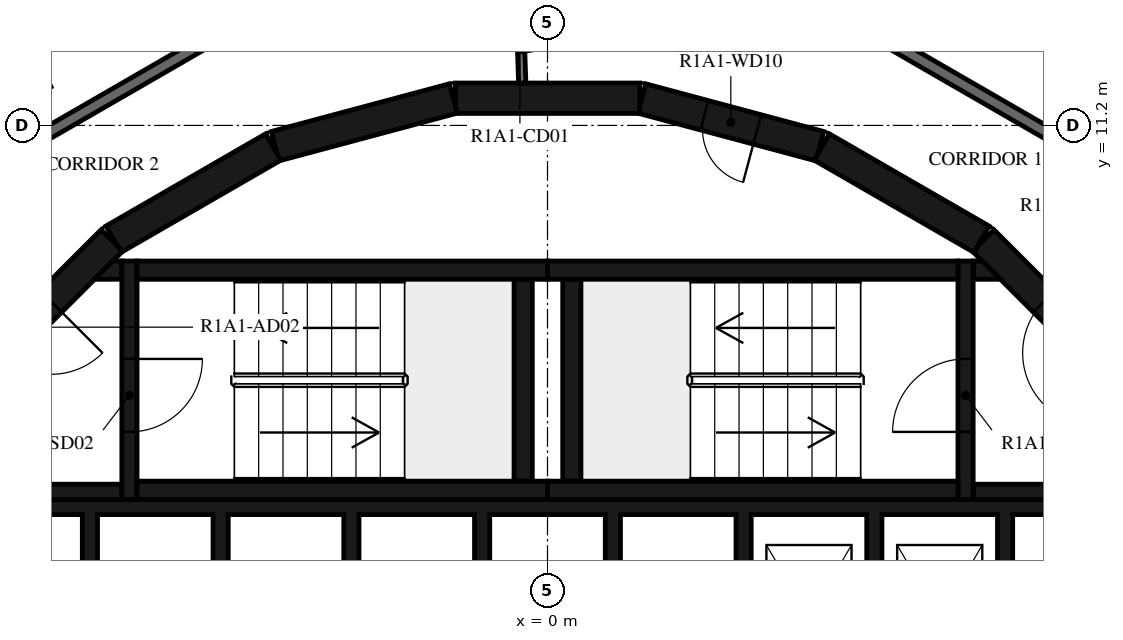
"""IFC4 building model, lengths in metres.
Left out: names, types, materials, properties, quantities, classifications, styles, units other than length and angle.
Written with IfcOpenShell. Run it as: python <this file> out.ifc"""

import sys

from ifc_helpers import new_model, si_unit, direction, frame, frame_2d, origin, place, context, subcontext, project, spatial, polyline, rectangle, outline, extrude, element, fill, save


model = new_model("IFC4")
c1 = context("Model", 3, precision=1e-05, world=origin(), true_north=direction((0.0, 1.0)))
c2 = subcontext(c1, "Body", "Model", "MODEL_VIEW")
j1 = project(units=[si_unit("LENGTHUNIT", "METRE"), si_unit("PLANEANGLEUNIT", "RADIAN")], contexts=[c1])
p1 = place(None, origin())
s1 = spatial("IfcSite", under=j1, at=p1, CompositionType="ELEMENT")
p2 = place(p1, origin())
s2 = spatial("IfcBuilding", under=s1, at=p2, CompositionType="ELEMENT")
p3 = place(p2, frame((0.0, 0.0, 41.9)))
s3 = spatial("IfcBuildingStorey", under=s2, at=p3, CompositionType="ELEMENT", Elevation=41.9)
p4 = place(p3, frame((9.308, 7.164, 0.0), z_axis=(0.0, 0.0, 1.0), x_axis=(-0.707106781187, 0.707106781187, 0.0)))
e1 = element("IfcWall", 1, at=p4, inside=s3, PredefinedType="SHEAR", context=c2, shape_type="SweptSolid", body=[
    extrude(rectangle(XDim=3.032, YDim=0.5, at=frame_2d((1.516, 0.0))), origin(), (0.0, 0.0, 1.0), 3.12),
])
p5 = place(p4, frame((0.416, 0.0, 0.0)))
e2 = element("IfcOpeningElement", 2, at=p5, cuts=e1, PredefinedType="OPENING", context=c2, shape_type="SweptSolid", body=[
    extrude(rectangle(XDim=1.2, YDim=2.1, at=frame_2d((0.6, 1.05))), frame((0.0, 0.26, 0.0), z_axis=(0.0, -1.0, 0.0), x_axis=(1.0, 0.0, 0.0)), (0.0, 0.0, 1.0), 0.52),
])
p6 = place(p3, frame((7.137, 9.329, 0.0), z_axis=(0.0, 0.0, 1.0), x_axis=(-0.865975092491, 0.500087131594, 0.0)))
e3 = element("IfcWall", 3, at=p6, inside=s3, PredefinedType="SHEAR", context=c2, shape_type="SweptSolid", body=[
    extrude(rectangle(XDim=3.033, YDim=0.5, at=frame_2d((1.516, 0.0))), origin(), (0.0, 0.0, 1.0), 3.12),
])
p7 = place(p3, frame((4.479, 10.858, 0.0), z_axis=(0.0, 0.0, 1.0), x_axis=(-0.965948410781, 0.258734743916, 0.0)))
e4 = element("IfcWall", 4, at=p7, inside=s3, PredefinedType="SHEAR", context=c2, shape_type="SweptSolid", body=[
    extrude(rectangle(XDim=3.033, YDim=0.5, at=frame_2d((1.516, 0.0))), origin(), (0.0, 0.0, 1.0), 3.12),
])
p8 = place(p7, frame((1.066, 0.0, 0.0)))
e5 = element("IfcOpeningElement", 5, at=p8, cuts=e4, PredefinedType="OPENING", context=c2, shape_type="SweptSolid", body=[
    extrude(rectangle(XDim=0.9, YDim=2.1, at=frame_2d((0.45, 1.05))), frame((0.0, 0.26, 0.0), z_axis=(0.0, -1.0, 0.0), x_axis=(1.0, 0.0, 0.0)), (0.0, 0.0, 1.0), 0.52),
])
for number, where, z_axis, x_axis in (
    (6, (1.516, 11.647, 0.0), (0.0, 0.0, 1.0), (-1.0, 0.0, 0.0)),
    (7, (-1.55, 11.643, 0.0), (0.0, 0.0, 1.0), (-0.966, -0.259, 0.0)),
    (8, (-4.51, 10.845, 0.0), (0.0, 0.0, 1.0), (-0.866, -0.5, 0.0)),
):
    element("IfcWall", number, at=place(p3, frame(where, z_axis=z_axis, x_axis=x_axis)), inside=s3, PredefinedType="SHEAR", context=c2, shape_type="SweptSolid", body=[
        extrude(rectangle(XDim=3.033, YDim=0.5, at=frame_2d((1.516, 0.0))), origin(), (0.0, 0.0, 1.0), 3.12),
    ])
p9 = place(p3, frame((-7.164, 9.308, 0.0), z_axis=(0.0, 0.0, 1.0), x_axis=(-0.707106781187, -0.707106781187, 0.0)))
e9 = element("IfcWall", 9, at=p9, inside=s3, PredefinedType="SHEAR", context=c2, shape_type="SweptSolid", body=[
    extrude(rectangle(XDim=3.032, YDim=0.5, at=frame_2d((1.516, 0.0))), origin(), (0.0, 0.0, 1.0), 3.12),
])
p10 = place(p9, frame((1.416, 0.0, 0.0)))
e10 = element("IfcOpeningElement", 10, at=p10, cuts=e9, PredefinedType="OPENING", context=c2, shape_type="SweptSolid", body=[
    extrude(rectangle(XDim=1.2, YDim=2.1, at=frame_2d((0.6, 1.05))), frame((0.0, 0.26, 0.0), z_axis=(0.0, -1.0, 0.0), x_axis=(1.0, 0.0, 0.0)), (0.0, 0.0, 1.0), 0.52),
])
for number, where, z_axis, x_axis in (
    (11, (0.0, 5.2, 0.0), (0.0, 0.0, 1.0), (1.0, 0.0, 0.0)),
    (12, (0.0, 8.82, 0.0), (0.0, 0.0, 1.0), (1.0, 0.0, 0.0)),
):
    element("IfcWall", number, at=place(p3, frame(where, z_axis=z_axis, x_axis=x_axis)), inside=s3, PredefinedType="SHEAR", context=c2, shape_type="SweptSolid", body=[
        extrude(rectangle(XDim=6.75, YDim=0.3, at=frame_2d((3.375, 0.0))), origin(), (0.0, 0.0, 1.0), 3.12),
    ])
p11 = place(p3, frame((0.4, 5.35, 0.0), z_axis=(0.0, 0.0, 1.0), x_axis=(0.0, 1.0, 0.0)))
e13 = element("IfcWall", 13, at=p11, inside=s3, PredefinedType="SHEAR", context=c2, shape_type="SweptSolid", body=[
    extrude(rectangle(XDim=3.32, YDim=0.3, at=frame_2d((1.66, 0.0))), origin(), (0.0, 0.0, 1.0), 3.12),
])
p12 = place(p3, frame((6.875, 5.05, 0.0), z_axis=(0.0, 0.0, 1.0), x_axis=(0.0, 1.0, 0.0)))
e14 = element("IfcWall", 14, at=p12, inside=s3, PredefinedType="SHEAR", context=c2, shape_type="SweptSolid", body=[
    extrude(rectangle(XDim=3.92, YDim=0.25, at=frame_2d((1.96, 0.0))), origin(), (0.0, 0.0, 1.0), 3.12),
])
p13 = place(p12, frame((1.11, 0.0, 0.0)))
e15 = element("IfcOpeningElement", 15, at=p13, cuts=e14, PredefinedType="OPENING", context=c2, shape_type="SweptSolid", body=[
    extrude(rectangle(XDim=1.2, YDim=2.1, at=frame_2d((0.6, 1.05))), frame((0.0, 0.135, 0.0), z_axis=(0.0, -1.0, 0.0), x_axis=(1.0, 0.0, 0.0)), (0.0, 0.0, 1.0), 0.27),
])
p14 = place(p3, frame((7.0, 5.175, 0.0), z_axis=(0.0, 0.0, 1.0), x_axis=(1.0, 0.0, 0.0)))
e16 = element("IfcWall", 16, at=p14, inside=s3, PredefinedType="SHEAR", context=c2, shape_type="SweptSolid", body=[
    extrude(rectangle(XDim=3.1, YDim=0.25, at=frame_2d((1.55, 0.0))), origin(), (0.0, 0.0, 1.0), 3.12),
])
p15 = place(p3, origin())
e17 = element("IfcWall", 17, at=p15, inside=s3, PredefinedType="SHEAR", context=c2, shape_type="SweptSolid", body=[
    extrude(outline(polyline([(7.448, 8.67), (7.0, 8.67), (7.0, 8.97), (7.148, 8.97), (7.448, 8.67)])), origin(), (0.0, 0.0, 1.0), 3.12),
])
for number, where, z_axis, x_axis in (
    (18, (-6.75, 5.2, 0.0), (0.0, 0.0, 1.0), (1.0, 0.0, 0.0)),
    (19, (-6.75, 8.82, 0.0), (0.0, 0.0, 1.0), (1.0, 0.0, 0.0)),
):
    element("IfcWall", number, at=place(p3, frame(where, z_axis=z_axis, x_axis=x_axis)), inside=s3, PredefinedType="SHEAR", context=c2, shape_type="SweptSolid", body=[
        extrude(rectangle(XDim=6.75, YDim=0.3, at=frame_2d((3.375, 0.0))), origin(), (0.0, 0.0, 1.0), 3.12),
    ])
p16 = place(p3, frame((-0.4, 5.35, 0.0), z_axis=(0.0, 0.0, 1.0), x_axis=(0.0, 1.0, 0.0)))
e20 = element("IfcWall", 20, at=p16, inside=s3, PredefinedType="SHEAR", context=c2, shape_type="SweptSolid", body=[
    extrude(rectangle(XDim=3.32, YDim=0.3, at=frame_2d((1.66, 0.0))), origin(), (0.0, 0.0, 1.0), 3.12),
])
p17 = place(p3, frame((-6.875, 8.97, 0.0), z_axis=(0.0, 0.0, 1.0), x_axis=(0.0, -1.0, 0.0)))
e21 = element("IfcWall", 21, at=p17, inside=s3, PredefinedType="SHEAR", context=c2, shape_type="SweptSolid", body=[
    extrude(rectangle(XDim=3.92, YDim=0.25, at=frame_2d((1.96, 0.0))), origin(), (0.0, 0.0, 1.0), 3.12),
])
p18 = place(p17, frame((1.61, 0.0, 0.0)))
e22 = element("IfcOpeningElement", 22, at=p18, cuts=e21, PredefinedType="OPENING", context=c2, shape_type="SweptSolid", body=[
    extrude(rectangle(XDim=1.2, YDim=2.1, at=frame_2d((0.6, 1.05))), frame((0.0, 0.135, 0.0), z_axis=(0.0, -1.0, 0.0), x_axis=(1.0, 0.0, 0.0)), (0.0, 0.0, 1.0), 0.27),
])
p19 = place(p3, frame((-7.0, 5.175, 0.0), z_axis=(0.0, 0.0, 1.0), x_axis=(-1.0, 0.0, 0.0)))
e23 = element("IfcWall", 23, at=p19, inside=s3, PredefinedType="SHEAR", context=c2, shape_type="SweptSolid", body=[
    extrude(rectangle(XDim=3.1, YDim=0.25, at=frame_2d((1.55, 0.0))), origin(), (0.0, 0.0, 1.0), 3.12),
])
p20 = place(p3, origin())
e24 = element("IfcWall", 24, at=p20, inside=s3, PredefinedType="SHEAR", context=c2, shape_type="SweptSolid", body=[
    extrude(outline(polyline([(-7.148, 8.97), (-7.0, 8.97), (-7.0, 8.67), (-7.448, 8.67), (-7.148, 8.97)])), origin(), (0.0, 0.0, 1.0), 3.12),
])
p21 = place(p3, origin())
e25 = element("IfcWall", 25, at=p21, inside=s3, PredefinedType="SHEAR", context=c2, shape_type="SweptSolid", body=[
    extrude(outline(polyline([(-9.55, 4.8), (-7.65, 4.8), (-7.65, 1.9), (-7.4, 1.9), (-7.4, 4.8), (-5.5, 4.8), (-5.5, 1.9), (-5.25, 1.9), (-5.25, 4.8), (-3.35, 4.8), (-3.35, 1.9), (-3.1, 1.9), (-3.1, 4.8), (-1.2, 4.8), (-1.2, 1.9), (-0.95, 1.9), (-0.95, 4.8), (0.95, 4.8), (0.95, 1.9), (1.2, 1.9), (1.2, 4.8), (3.1, 4.8), (3.1, 1.9), (3.35, 1.9), (3.35, 4.8), (5.25, 4.8), (5.25, 1.9), (5.5, 1.9), (5.5, 4.8), (7.4, 4.8), (7.4, 1.9), (7.65, 1.9), (7.65, 4.8), (9.55, 4.8), (9.55, 1.9), (9.8, 1.9), (9.8, 4.8), (9.8, 5.05), (-9.8, 5.05), (-9.8, 4.8), (-9.8, 1.9), (-9.55, 1.9), (-9.55, 4.8)])), origin(), (0.0, 0.0, 1.0), 3.12),
])
p22 = place(p3, frame((-0.479, 13.7, 0.0), z_axis=(0.0, 0.0, 1.0), x_axis=(0.034919103017, -0.999390142159, 0.0)))
e26 = element("IfcWall", 26, at=p22, inside=s3, PredefinedType="PARTITIONING", context=c2, shape_type="SweptSolid", body=[
    extrude(rectangle(XDim=1.804, YDim=0.12, at=frame_2d((0.902, 0.0))), origin(), (0.0, 0.0, 1.0), 3.12),
])
p23 = place(p22, frame((0.11, 0.0, 0.0)))
e27 = element("IfcOpeningElement", 27, at=p23, cuts=e26, PredefinedType="OPENING", context=c2, shape_type="SweptSolid", body=[
    extrude(rectangle(XDim=1.2, YDim=2.1, at=frame_2d((0.6, 1.05))), frame((0.0, 0.07, 0.0), z_axis=(0.0, -1.0, 0.0), x_axis=(1.0, 0.0, 0.0)), (0.0, 0.0, 1.0), 0.14),
])
p24 = place(p3, frame((10.029, 10.029, 0.0), z_axis=(0.0, 0.0, 1.0), x_axis=(-0.866024439905, 0.500001669485, 0.0)))
e28 = element("IfcWall", 28, at=p24, inside=s3, PredefinedType="STANDARD", context=c2, shape_type="SweptSolid", body=[
    extrude(rectangle(XDim=7.342, YDim=0.2, at=frame_2d((3.671, 0.0))), origin(), (0.0, 0.0, 1.0), 3.12),
])
p25 = place(p3, frame((-3.671, 13.7, 0.0), z_axis=(0.0, 0.0, 1.0), x_axis=(-0.866031419417, -0.499989580474, 0.0)))
e29 = element("IfcWall", 29, at=p25, inside=s3, PredefinedType="STANDARD", context=c2, shape_type="SweptSolid", body=[
    extrude(rectangle(XDim=7.147, YDim=0.2, at=frame_2d((3.573, 0.0))), origin(), (0.0, 0.0, 1.0), 3.12),
])
p26 = place(p25, frame((5.947, 0.0, 0.0)))
e30 = element("IfcOpeningElement", 30, at=p26, cuts=e29, PredefinedType="OPENING", context=c2, shape_type="SweptSolid", body=[
    extrude(rectangle(XDim=1.0, YDim=2.1, at=frame_2d((0.5, 1.05))), frame((0.0, 0.11, 0.0), z_axis=(0.0, -1.0, 0.0), x_axis=(1.0, 0.0, 0.0)), (0.0, 0.0, 1.0), 0.22),
])
p27 = place(p3, frame((11.139, 11.167, 0.0), z_axis=(0.0, 0.0, 1.0), x_axis=(-0.499994660107, 0.866028486751, 0.0)))
e31 = element("IfcWall", 31, at=p27, inside=s3, PredefinedType="PARTITIONING", context=c2, shape_type="SweptSolid", body=[
    extrude(rectangle(XDim=15.786, YDim=0.12, at=frame_2d((7.893, 0.0))), origin(), (0.0, 0.0, 1.0), 3.12),
])
p28 = place(p27, frame((5.279, 0.0, 0.0)))
e32 = element("IfcOpeningElement", 32, at=p28, cuts=e31, PredefinedType="OPENING", context=c2, shape_type="SweptSolid", body=[
    extrude(rectangle(XDim=0.9, YDim=2.1, at=frame_2d((0.45, 1.05))), frame((0.0, 0.07, 0.0), z_axis=(0.0, -1.0, 0.0), x_axis=(1.0, 0.0, 0.0)), (0.0, 0.0, 1.0), 0.14),
])
p29 = place(p27, frame((12.23, 0.0, 0.0)))
e33 = element("IfcOpeningElement", 33, at=p29, cuts=e31, PredefinedType="OPENING", context=c2, shape_type="SweptSolid", body=[
    extrude(rectangle(XDim=0.9, YDim=2.1, at=frame_2d((0.45, 1.05))), frame((0.0, 0.07, 0.0), z_axis=(0.0, -1.0, 0.0), x_axis=(1.0, 0.0, 0.0)), (0.0, 0.0, 1.0), 0.14),
])
p30 = place(p3, frame((11.127, 11.127, 0.0), z_axis=(0.0, 0.0, 1.0), x_axis=(-0.866043916853, 0.499967933054, 0.0)))
e34 = element("IfcWall", 34, at=p30, inside=s3, PredefinedType="PARTITIONING", context=c2, shape_type="SweptSolid", body=[
    extrude(rectangle(XDim=4.821, YDim=0.12, at=frame_2d((2.411, 0.0))), origin(), (0.0, 0.0, 1.0), 3.12),
])
p31 = place(p30, frame((1.4, 0.0, 0.0)))
e35 = element("IfcOpeningElement", 35, at=p31, cuts=e34, PredefinedType="OPENING", context=c2, shape_type="SweptSolid", body=[
    extrude(rectangle(XDim=0.8, YDim=2.1, at=frame_2d((0.4, 1.05))), frame((0.0, 0.07, 0.0), z_axis=(0.0, -1.0, 0.0), x_axis=(1.0, 0.0, 0.0)), (0.0, 0.0, 1.0), 0.14),
])
p32 = place(p3, frame((-4.073, 15.2, 0.0), z_axis=(0.0, 0.0, 1.0), x_axis=(-0.866024802457, -0.500001041529, 0.0)))
e36 = element("IfcWall", 36, at=p32, inside=s3, PredefinedType="PARTITIONING", context=c2, shape_type="SweptSolid", body=[
    extrude(rectangle(XDim=6.751, YDim=0.12, at=frame_2d((3.376, 0.0))), origin(), (0.0, 0.0, 1.0), 3.12),
])
p33 = place(p32, frame((0.2, 0.0, 0.0)))
e37 = element("IfcOpeningElement", 37, at=p33, cuts=e36, PredefinedType="OPENING", context=c2, shape_type="SweptSolid", body=[
    extrude(rectangle(XDim=0.8, YDim=2.1, at=frame_2d((0.4, 1.05))), frame((0.0, 0.07, 0.0), z_axis=(0.0, -1.0, 0.0), x_axis=(1.0, 0.0, 0.0)), (0.0, 0.0, 1.0), 0.14),
])
p34 = place(p32, frame((5.206, 0.0, 0.0)))
e38 = element("IfcOpeningElement", 38, at=p34, cuts=e36, PredefinedType="OPENING", context=c2, shape_type="SweptSolid", body=[
    extrude(rectangle(XDim=0.9, YDim=2.1, at=frame_2d((0.45, 1.05))), frame((0.0, 0.07, 0.0), z_axis=(0.0, -1.0, 0.0), x_axis=(1.0, 0.0, 0.0)), (0.0, 0.0, 1.0), 0.14),
])
p35 = place(p13, origin())
e39 = element("IfcDoor", 39, at=p35, inside=s3, OperationType="SINGLE_SWING_LEFT", PredefinedType="DOOR", context=c2, shape_type="SweptSolid", body=[
    extrude(rectangle(XDim=1.2, YDim=2.1, at=frame_2d((0.6, 1.05))), frame((0.0, 0.025, 0.0), z_axis=(0.0, -1.0, 0.0), x_axis=(1.0, 0.0, 0.0)), (0.0, 0.0, 1.0), 0.05),
])
fill(e15, e39)
p36 = place(p5, origin())
e40 = element("IfcDoor", 40, at=p36, inside=s3, OperationType="SINGLE_SWING_RIGHT", PredefinedType="DOOR", context=c2, shape_type="SweptSolid", body=[
    extrude(rectangle(XDim=1.2, YDim=2.1, at=frame_2d((0.6, 1.05))), frame((0.0, 0.025, 0.0), z_axis=(0.0, -1.0, 0.0), x_axis=(1.0, 0.0, 0.0)), (0.0, 0.0, 1.0), 0.05),
])
fill(e2, e40)
p37 = place(p18, origin())
e41 = element("IfcDoor", 41, at=p37, inside=s3, OperationType="SINGLE_SWING_LEFT", PredefinedType="DOOR", context=c2, shape_type="SweptSolid", body=[
    extrude(rectangle(XDim=1.2, YDim=2.1, at=frame_2d((0.6, 1.05))), frame((0.0, 0.025, 0.0), z_axis=(0.0, -1.0, 0.0), x_axis=(1.0, 0.0, 0.0)), (0.0, 0.0, 1.0), 0.05),
])
fill(e22, e41)
p38 = place(p10, origin())
e42 = element("IfcDoor", 42, at=p38, inside=s3, OperationType="SINGLE_SWING_RIGHT", PredefinedType="DOOR", context=c2, shape_type="SweptSolid", body=[
    extrude(rectangle(XDim=1.2, YDim=2.1, at=frame_2d((0.6, 1.05))), frame((0.0, 0.025, 0.0), z_axis=(0.0, -1.0, 0.0), x_axis=(1.0, 0.0, 0.0)), (0.0, 0.0, 1.0), 0.05),
])
fill(e10, e42)
p39 = place(p8, origin())
e43 = element("IfcDoor", 43, at=p39, inside=s3, OperationType="SINGLE_SWING_LEFT", PredefinedType="DOOR", context=c2, shape_type="SweptSolid", body=[
    extrude(rectangle(XDim=0.9, YDim=2.1, at=frame_2d((0.45, 1.05))), frame((0.0, 0.025, 0.0), z_axis=(0.0, -1.0, 0.0), x_axis=(1.0, 0.0, 0.0)), (0.0, 0.0, 1.0), 0.05),
])
fill(e5, e43)
p40 = place(p23, origin())
e44 = element("IfcDoor", 44, at=p40, inside=s3, OperationType="DOUBLE_DOOR_SINGLE_SWING", PredefinedType="DOOR", context=c2, shape_type="SweptSolid", body=[
    extrude(rectangle(XDim=1.2, YDim=2.1, at=frame_2d((0.6, 1.05))), frame((0.0, 0.025, 0.0), z_axis=(0.0, -1.0, 0.0), x_axis=(1.0, 0.0, 0.0)), (0.0, 0.0, 1.0), 0.05),
])
fill(e27, e44)
save(model, sys.argv[1])
